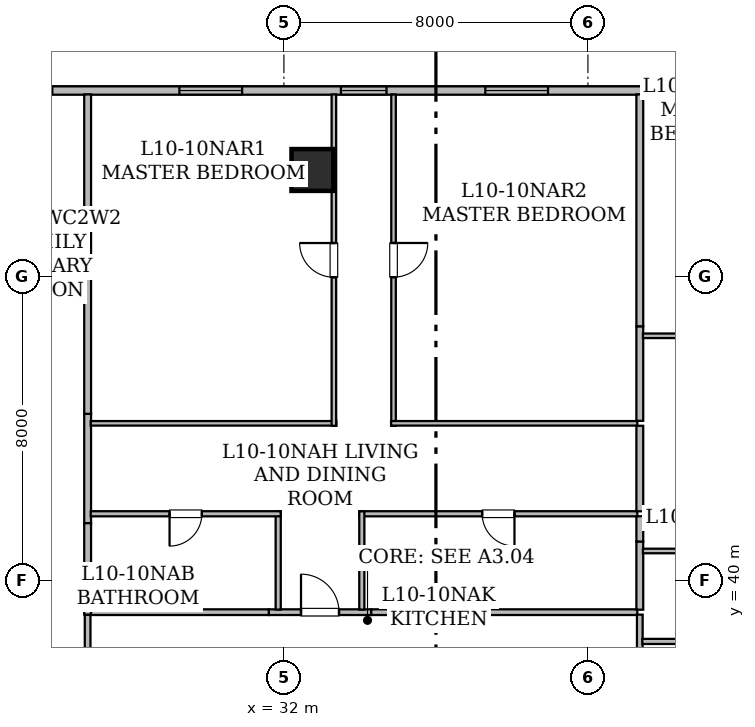
"""IFC4 building model, lengths in metres.
Left out: names, types, materials, properties, quantities, classifications, styles, units other than length and angle.
Written with IfcOpenShell. Run it as: python <this file> out.ifc"""

import sys

from ifc_helpers import new_model, si_unit, direction, frame, frame_2d, origin, origin_2d, place, context, subcontext, project, spatial, rectangle, hollow_rectangle, extrude, element, fill, save


model = new_model("IFC4")
c1 = context("Model", 3, precision=1e-05, world=origin(), true_north=direction((0.0, 1.0)))
c2 = subcontext(c1, "Body", "Model", "MODEL_VIEW")
j1 = project(units=[si_unit("LENGTHUNIT", "METRE"), si_unit("PLANEANGLEUNIT", "RADIAN")], contexts=[c1])
p1 = place(None, origin())
s1 = spatial("IfcSite", under=j1, at=p1, CompositionType="ELEMENT")
p2 = place(p1, origin())
s2 = spatial("IfcBuilding", under=s1, at=p2, CompositionType="ELEMENT")
p3 = place(p2, frame((0.0, 0.0, 44.25)))
s3 = spatial("IfcBuildingStorey", under=s2, at=p3, CompositionType="ELEMENT", Elevation=44.25)
p4 = place(p3, frame((32.75, 50.8, 0.0), z_axis=(0.0, 0.0, 1.0), x_axis=(1.0, 0.0, 0.0)))
e1 = element("IfcColumn", 1, at=p4, inside=s3, PredefinedType="COLUMN", context=c2, shape_type="SweptSolid", body=[
    extrude(hollow_rectangle(XDim=1.1, YDim=1.1, WallThickness=0.055, at=origin_2d()), origin(), (0.0, 0.0, 1.0), 3.65),
])
p5 = place(p3, frame((8.315, 52.89, 0.0), z_axis=(0.0, 0.0, 1.0), x_axis=(1.0, 0.0, 0.0)))
e2 = element("IfcWall", 2, at=p5, inside=s3, PredefinedType="STANDARD", context=c2, shape_type="SweptSolid", body=[
    extrude(rectangle(XDim=37.439, YDim=0.22, at=frame_2d((18.719, 0.0))), origin(), (0.0, 0.0, 1.0), 3.43),
])
p6 = place(p5, frame((3.164, 0.0, 0.85)))
e3 = element("IfcOpeningElement", 3, at=p6, cuts=e2, PredefinedType="OPENING", context=c2, shape_type="SweptSolid", body=[
    extrude(rectangle(XDim=1.65, YDim=1.55, at=frame_2d((0.825, 0.775))), frame((0.0, 0.12, 0.0), z_axis=(0.0, -1.0, 0.0), x_axis=(1.0, 0.0, 0.0)), (0.0, 0.0, 1.0), 0.24),
])
p7 = place(p5, frame((15.94, 0.0, 0.85)))
e4 = element("IfcOpeningElement", 4, at=p7, cuts=e2, PredefinedType="OPENING", context=c2, shape_type="SweptSolid", body=[
    extrude(rectangle(XDim=1.65, YDim=1.55, at=frame_2d((0.825, 0.775))), frame((0.0, 0.12, 0.0), z_axis=(0.0, -1.0, 0.0), x_axis=(1.0, 0.0, 0.0)), (0.0, 0.0, 1.0), 0.24),
])
p8 = place(p5, frame((13.619, 0.0, 0.8)))
e5 = element("IfcOpeningElement", 5, at=p8, cuts=e2, PredefinedType="OPENING", context=c2, shape_type="SweptSolid", body=[
    extrude(rectangle(XDim=1.2, YDim=1.5, at=frame_2d((0.6, 0.75))), frame((0.0, 0.12, 0.0), z_axis=(0.0, -1.0, 0.0), x_axis=(1.0, 0.0, 0.0)), (0.0, 0.0, 1.0), 0.24),
])
p9 = place(p5, frame((8.999, 0.0, 0.85)))
e6 = element("IfcOpeningElement", 6, at=p9, cuts=e2, PredefinedType="OPENING", context=c2, shape_type="SweptSolid", body=[
    extrude(rectangle(XDim=1.65, YDim=1.55, at=frame_2d((0.825, 0.775))), frame((0.0, 0.12, 0.0), z_axis=(0.0, -1.0, 0.0), x_axis=(1.0, 0.0, 0.0)), (0.0, 0.0, 1.0), 0.24),
])
p10 = place(p5, frame((25.185, 0.0, 0.8)))
e7 = element("IfcOpeningElement", 7, at=p10, cuts=e2, PredefinedType="OPENING", context=c2, shape_type="SweptSolid", body=[
    extrude(rectangle(XDim=1.2, YDim=1.5, at=frame_2d((0.6, 0.75))), frame((0.0, 0.12, 0.0), z_axis=(0.0, -1.0, 0.0), x_axis=(1.0, 0.0, 0.0)), (0.0, 0.0, 1.0), 0.24),
])
p11 = place(p5, frame((20.935, 0.0, 0.85)))
e8 = element("IfcOpeningElement", 8, at=p11, cuts=e2, PredefinedType="OPENING", context=c2, shape_type="SweptSolid", body=[
    extrude(rectangle(XDim=1.65, YDim=1.55, at=frame_2d((0.825, 0.775))), frame((0.0, 0.12, 0.0), z_axis=(0.0, -1.0, 0.0), x_axis=(1.0, 0.0, 0.0)), (0.0, 0.0, 1.0), 0.24),
])
p12 = place(p5, frame((28.985, 0.0, 0.85)))
e9 = element("IfcOpeningElement", 9, at=p12, cuts=e2, PredefinedType="OPENING", context=c2, shape_type="SweptSolid", body=[
    extrude(rectangle(XDim=1.65, YDim=1.55, at=frame_2d((0.825, 0.775))), frame((0.0, 0.12, 0.0), z_axis=(0.0, -1.0, 0.0), x_axis=(1.0, 0.0, 0.0)), (0.0, 0.0, 1.0), 0.24),
])
p13 = place(p5, frame((33.98, 0.0, 0.85)))
e10 = element("IfcOpeningElement", 10, at=p13, cuts=e2, PredefinedType="OPENING", context=c2, shape_type="SweptSolid", body=[
    extrude(rectangle(XDim=1.65, YDim=1.55, at=frame_2d((0.825, 0.775))), frame((0.0, 0.12, 0.0), z_axis=(0.0, -1.0, 0.0), x_axis=(1.0, 0.0, 0.0)), (0.0, 0.0, 1.0), 0.24),
])
p14 = place(p3, frame((26.835, 35.457, 0.0), z_axis=(0.0, 0.0, 1.0), x_axis=(0.0, 1.0, 0.0)))
e11 = element("IfcWall", 11, at=p14, inside=s3, PredefinedType="STANDARD", context=c2, shape_type="SweptSolid", body=[
    extrude(rectangle(XDim=3.643, YDim=0.15, at=frame_2d((1.822, 0.0))), origin(), (0.0, 0.0, 1.0), 2.647),
])
p15 = place(p3, frame((31.601, 39.165, 0.0), z_axis=(0.0, 0.0, 1.0), x_axis=(1.0, 0.0, 0.0)))
e12 = element("IfcWall", 12, at=p15, inside=s3, PredefinedType="STANDARD", context=c2, shape_type="SweptSolid", body=[
    extrude(rectangle(XDim=2.698, YDim=0.15, at=frame_2d((1.349, 0.0))), origin(), (0.0, 0.0, 1.0), 3.43),
])
p16 = place(p15, frame((0.849, 0.0, 0.0)))
e13 = element("IfcOpeningElement", 13, at=p16, cuts=e12, PredefinedType="OPENING", context=c2, shape_type="SweptSolid", body=[
    extrude(rectangle(XDim=1.0, YDim=2.15, at=frame_2d((0.5, 1.075))), frame((0.0, 0.085, 0.0), z_axis=(0.0, -1.0, 0.0), x_axis=(1.0, 0.0, 0.0)), (0.0, 0.0, 1.0), 0.17),
])
p17 = place(p3, frame((26.9, 39.165, 0.0), z_axis=(0.0, 0.0, 1.0), x_axis=(1.0, 0.0, 0.0)))
e14 = element("IfcWall", 14, at=p17, inside=s3, PredefinedType="STANDARD", context=c2, shape_type="SweptSolid", body=[
    extrude(rectangle(XDim=4.701, YDim=0.15, at=frame_2d((2.351, 0.0))), origin(), (0.0, 0.0, 1.0), 2.647),
])
p18 = place(p3, frame((34.299, 39.165, 0.0), z_axis=(0.0, 0.0, 1.0), x_axis=(1.0, 0.0, 0.0)))
e15 = element("IfcWall", 15, at=p18, inside=s3, PredefinedType="STANDARD", context=c2, shape_type="SweptSolid", body=[
    extrude(rectangle(XDim=7.001, YDim=0.15, at=frame_2d((3.5, 0.0))), origin(), (0.0, 0.0, 1.0), 3.43),
])
p19 = place(p3, frame((41.365, 39.1, 0.0), z_axis=(0.0, 0.0, 1.0), x_axis=(0.0, -1.0, 0.0)))
e16 = element("IfcWall", 16, at=p19, inside=s3, PredefinedType="STANDARD", context=c2, shape_type="SweptSolid", body=[
    extrude(rectangle(XDim=0.954, YDim=0.15, at=frame_2d((0.477, 0.0))), origin(), (0.0, 0.0, 1.0), 3.43),
])
p20 = place(p3, frame((26.835, 44.383, 0.0), z_axis=(0.0, 0.0, 1.0), x_axis=(0.0, -1.0, 0.0)))
e17 = element("IfcWall", 17, at=p20, inside=s3, PredefinedType="STANDARD", context=c2, shape_type="SweptSolid", body=[
    extrude(rectangle(XDim=2.878, YDim=0.18, at=frame_2d((1.439, 0.0))), origin(), (0.0, 0.0, 1.0), 2.957),
])
p21 = place(p3, frame((26.835, 41.505, 0.0), z_axis=(0.0, 0.0, 1.0), x_axis=(0.0, -1.0, 0.0)))
e18 = element("IfcWall", 18, at=p21, inside=s3, PredefinedType="STANDARD", context=c2, shape_type="SweptSolid", body=[
    extrude(rectangle(XDim=2.405, YDim=0.18, at=frame_2d((1.202, 0.0))), origin(), (0.0, 0.0, 1.0), 3.43),
])
p22 = place(p3, frame((26.835, 52.788, 0.0), z_axis=(0.0, 0.0, 1.0), x_axis=(0.0, -1.0, 0.0)))
e19 = element("IfcWall", 19, at=p22, inside=s3, PredefinedType="STANDARD", context=c2, shape_type="SweptSolid", body=[
    extrude(rectangle(XDim=8.405, YDim=0.18, at=frame_2d((4.203, 0.0))), origin(), (0.0, 0.0, 1.0), 2.803),
])
p23 = place(p3, frame((31.85, 39.232, 0.0), z_axis=(0.0, 0.0, 1.0), x_axis=(0.0, 1.0, 0.0)))
e20 = element("IfcWall", 20, at=p23, inside=s3, PredefinedType="PARTITIONING", context=c2, shape_type="SweptSolid", body=[
    extrude(rectangle(XDim=2.587, YDim=0.135, at=frame_2d((1.293, 0.0))), origin(), (0.0, 0.0, 1.0), 3.43),
])
p24 = place(p3, frame((31.915, 41.754, 0.0), z_axis=(0.0, 0.0, 1.0), x_axis=(-1.0, 0.0, 0.0)))
e21 = element("IfcWall", 21, at=p24, inside=s3, PredefinedType="PARTITIONING", context=c2, shape_type="SweptSolid", body=[
    extrude(rectangle(XDim=4.998, YDim=0.135, at=frame_2d((2.499, 0.0))), origin(), (0.0, 0.0, 1.0), 2.647),
])
p25 = place(p24, frame((2.074, 0.0, 0.0)))
e22 = element("IfcOpeningElement", 22, at=p25, cuts=e21, PredefinedType="OPENING", context=c2, shape_type="SweptSolid", body=[
    extrude(rectangle(XDim=0.85, YDim=2.1, at=frame_2d((0.425, 1.05))), frame((0.0, 0.077, 0.0), z_axis=(0.0, -1.0, 0.0), x_axis=(1.0, 0.0, 0.0)), (0.0, 0.0, 1.0), 0.155),
])
p26 = place(p3, frame((41.3, 41.754, 0.0), z_axis=(0.0, 0.0, 1.0), x_axis=(-1.0, 0.0, 0.0)))
e23 = element("IfcWall", 23, at=p26, inside=s3, PredefinedType="PARTITIONING", context=c2, shape_type="SweptSolid", body=[
    extrude(rectangle(XDim=7.315, YDim=0.135, at=frame_2d((3.657, 0.0))), origin(), (0.0, 0.0, 1.0), 3.43),
])
p27 = place(p26, frame((3.233, 0.0, 0.0)))
e24 = element("IfcOpeningElement", 24, at=p27, cuts=e23, PredefinedType="OPENING", context=c2, shape_type="SweptSolid", body=[
    extrude(rectangle(XDim=0.85, YDim=2.1, at=frame_2d((0.425, 1.05))), frame((0.0, 0.077, 0.0), z_axis=(0.0, -1.0, 0.0), x_axis=(1.0, 0.0, 0.0)), (0.0, 0.0, 1.0), 0.155),
])
p28 = place(p3, frame((34.05, 41.819, 0.0), z_axis=(0.0, 0.0, 1.0), x_axis=(0.0, -1.0, 0.0)))
e25 = element("IfcWall", 25, at=p28, inside=s3, PredefinedType="PARTITIONING", context=c2, shape_type="SweptSolid", body=[
    extrude(rectangle(XDim=2.587, YDim=0.135, at=frame_2d((1.293, 0.0))), origin(), (0.0, 0.0, 1.0), 3.43),
])
p29 = place(p3, frame((26.917, 44.134, 0.0), z_axis=(0.0, 0.0, 1.0), x_axis=(1.0, 0.0, 0.0)))
e26 = element("IfcWall", 26, at=p29, inside=s3, PredefinedType="PARTITIONING", context=c2, shape_type="SweptSolid", body=[
    extrude(rectangle(XDim=6.463, YDim=0.12, at=frame_2d((3.231, 0.0))), origin(), (0.0, 0.0, 1.0), 2.647),
])
p30 = place(p3, frame((33.315, 44.069, 0.0), z_axis=(0.0, 0.0, 1.0), x_axis=(0.0, 1.0, 0.0)))
e27 = element("IfcWall", 27, at=p30, inside=s3, PredefinedType="PARTITIONING", context=c2, shape_type="SweptSolid", body=[
    extrude(rectangle(XDim=8.719, YDim=0.12, at=frame_2d((4.359, 0.0))), origin(), (0.0, 0.0, 1.0), 2.803),
])
p31 = place(p30, frame((3.909, 0.0, 0.0)))
e28 = element("IfcOpeningElement", 28, at=p31, cuts=e27, PredefinedType="OPENING", context=c2, shape_type="SweptSolid", body=[
    extrude(rectangle(XDim=0.9, YDim=2.1, at=frame_2d((0.45, 1.05))), frame((0.0, 0.07, 0.0), z_axis=(0.0, -1.0, 0.0), x_axis=(1.0, 0.0, 0.0)), (0.0, 0.0, 1.0), 0.14),
])
p32 = place(p3, frame((34.885, 52.788, 0.0), z_axis=(0.0, 0.0, 1.0), x_axis=(0.0, -1.0, 0.0)))
e29 = element("IfcWall", 29, at=p32, inside=s3, PredefinedType="PARTITIONING", context=c2, shape_type="SweptSolid", body=[
    extrude(rectangle(XDim=8.719, YDim=0.12, at=frame_2d((4.359, 0.0))), origin(), (0.0, 0.0, 1.0), 2.803),
])
p33 = place(p32, frame((3.909, 0.0, 0.0)))
e30 = element("IfcOpeningElement", 30, at=p33, cuts=e29, PredefinedType="OPENING", context=c2, shape_type="SweptSolid", body=[
    extrude(rectangle(XDim=0.9, YDim=2.1, at=frame_2d((0.45, 1.05))), frame((0.0, 0.07, 0.0), z_axis=(0.0, -1.0, 0.0), x_axis=(1.0, 0.0, 0.0)), (0.0, 0.0, 1.0), 0.14),
])
p34 = place(p3, frame((34.82, 44.134, 0.0), z_axis=(0.0, 0.0, 1.0), x_axis=(1.0, 0.0, 0.0)))
e31 = element("IfcWall", 31, at=p34, inside=s3, PredefinedType="PARTITIONING", context=c2, shape_type="SweptSolid", body=[
    extrude(rectangle(XDim=6.48, YDim=0.12, at=frame_2d((3.24, 0.0))), origin(), (0.0, 0.0, 1.0), 3.43),
])
p35 = place(p3, frame((41.365, 44.069, 0.0), z_axis=(0.0, 0.0, 1.0), x_axis=(0.0, -1.0, 0.0)))
e32 = element("IfcWall", 32, at=p35, inside=s3, PredefinedType="STANDARD", context=c2, shape_type="SweptSolid", body=[
    extrude(rectangle(XDim=2.25, YDim=0.18, at=frame_2d((1.125, 0.0))), origin(), (0.0, 0.0, 1.0), 2.957),
])
p36 = place(p3, frame((41.365, 41.024, 0.0), z_axis=(0.0, 0.0, 1.0), x_axis=(0.0, -1.0, 0.0)))
e33 = element("IfcWall", 33, at=p36, inside=s3, PredefinedType="STANDARD", context=c2, shape_type="SweptSolid", body=[
    extrude(rectangle(XDim=1.794, YDim=0.18, at=frame_2d((0.897, 0.0))), origin(), (0.0, 0.0, 1.0), 3.43),
])
p37 = place(p3, frame((41.365, 41.689, 0.0), z_axis=(0.0, 0.0, 1.0), x_axis=(0.0, -1.0, 0.0)))
e34 = element("IfcWall", 34, at=p37, inside=s3, PredefinedType="STANDARD", context=c2, shape_type="SweptSolid", body=[
    extrude(rectangle(XDim=0.665, YDim=0.18, at=frame_2d((0.333, 0.0))), origin(), (0.0, 0.0, 1.0), 3.43),
])
p38 = place(p3, frame((41.365, 46.687, 0.0), z_axis=(0.0, 0.0, 1.0), x_axis=(0.0, -1.0, 0.0)))
e35 = element("IfcWall", 35, at=p38, inside=s3, PredefinedType="STANDARD", context=c2, shape_type="SweptSolid", body=[
    extrude(rectangle(XDim=2.488, YDim=0.18, at=frame_2d((1.244, 0.0))), origin(), (0.0, 0.0, 1.0), 3.43),
])
p39 = place(p3, frame((41.365, 52.788, 0.0), z_axis=(0.0, 0.0, 1.0), x_axis=(0.0, -1.0, 0.0)))
e36 = element("IfcWall", 36, at=p39, inside=s3, PredefinedType="STANDARD", context=c2, shape_type="SweptSolid", body=[
    extrude(rectangle(XDim=6.101, YDim=0.18, at=frame_2d((3.051, 0.0))), origin(), (0.0, 0.0, 1.0), 2.803),
])
p40 = place(p3, frame((44.625, 38.395, 0.0), z_axis=(0.0, 0.0, 1.0), x_axis=(-1.0, 0.0, 0.0)))
e37 = element("IfcWall", 37, at=p40, inside=s3, PredefinedType="PARTITIONING", context=c2, shape_type="SweptSolid", body=[
    extrude(rectangle(XDim=3.193, YDim=0.135, at=frame_2d((1.597, 0.0))), origin(), (0.0, 0.0, 1.0), 2.647),
])
p41 = place(p3, frame((41.447, 40.775, 0.0), z_axis=(0.0, 0.0, 1.0), x_axis=(1.0, 0.0, 0.0)))
e38 = element("IfcWall", 38, at=p41, inside=s3, PredefinedType="PARTITIONING", context=c2, shape_type="SweptSolid", body=[
    extrude(rectangle(XDim=3.493, YDim=0.12, at=frame_2d((1.747, 0.0))), origin(), (0.0, 0.0, 1.0), 2.647),
])
p42 = place(p3, frame((41.447, 46.437, 0.0), z_axis=(0.0, 0.0, 1.0), x_axis=(1.0, 0.0, 0.0)))
e39 = element("IfcWall", 39, at=p42, inside=s3, PredefinedType="PARTITIONING", context=c2, shape_type="SweptSolid", body=[
    extrude(rectangle(XDim=3.374, YDim=0.12, at=frame_2d((1.687, 0.0))), origin(), (0.0, 0.0, 1.0), 2.647),
])
p43 = place(p7, origin())
e40 = element("IfcWindow", 40, at=p43, inside=s3, PartitioningType="SINGLE_PANEL", PredefinedType="WINDOW", context=c2, shape_type="SweptSolid", body=[
    extrude(rectangle(XDim=1.65, YDim=1.55, at=frame_2d((0.825, 0.775))), frame((0.0, 0.03, 0.0), z_axis=(0.0, -1.0, 0.0), x_axis=(1.0, 0.0, 0.0)), (0.0, 0.0, 1.0), 0.06),
])
fill(e4, e40)
p44 = place(p10, origin())
e41 = element("IfcWindow", 41, at=p44, inside=s3, PartitioningType="SINGLE_PANEL", PredefinedType="WINDOW", context=c2, shape_type="SweptSolid", body=[
    extrude(rectangle(XDim=1.2, YDim=1.5, at=frame_2d((0.6, 0.75))), frame((0.0, 0.03, 0.0), z_axis=(0.0, -1.0, 0.0), x_axis=(1.0, 0.0, 0.0)), (0.0, 0.0, 1.0), 0.06),
])
fill(e7, e41)
p45 = place(p11, origin())
e42 = element("IfcWindow", 42, at=p45, inside=s3, PartitioningType="SINGLE_PANEL", PredefinedType="WINDOW", context=c2, shape_type="SweptSolid", body=[
    extrude(rectangle(XDim=1.65, YDim=1.55, at=frame_2d((0.825, 0.775))), frame((0.0, 0.03, 0.0), z_axis=(0.0, -1.0, 0.0), x_axis=(1.0, 0.0, 0.0)), (0.0, 0.0, 1.0), 0.06),
])
fill(e8, e42)
p46 = place(p12, origin())
e43 = element("IfcWindow", 43, at=p46, inside=s3, PartitioningType="SINGLE_PANEL", PredefinedType="WINDOW", context=c2, shape_type="SweptSolid", body=[
    extrude(rectangle(XDim=1.65, YDim=1.55, at=frame_2d((0.825, 0.775))), frame((0.0, 0.03, 0.0), z_axis=(0.0, -1.0, 0.0), x_axis=(1.0, 0.0, 0.0)), (0.0, 0.0, 1.0), 0.06),
])
fill(e9, e43)
p47 = place(p13, origin())
e44 = element("IfcWindow", 44, at=p47, inside=s3, PartitioningType="SINGLE_PANEL", PredefinedType="WINDOW", context=c2, shape_type="SweptSolid", body=[
    extrude(rectangle(XDim=1.65, YDim=1.55, at=frame_2d((0.825, 0.775))), frame((0.0, 0.03, 0.0), z_axis=(0.0, -1.0, 0.0), x_axis=(1.0, 0.0, 0.0)), (0.0, 0.0, 1.0), 0.06),
])
fill(e10, e44)
p48 = place(p16, origin())
e45 = element("IfcDoor", 45, at=p48, inside=s3, OperationType="SINGLE_SWING_LEFT", PredefinedType="DOOR", context=c2, shape_type="SweptSolid", body=[
    extrude(rectangle(XDim=1.0, YDim=2.15, at=frame_2d((0.5, 1.075))), frame((0.0, 0.025, 0.0), z_axis=(0.0, -1.0, 0.0), x_axis=(1.0, 0.0, 0.0)), (0.0, 0.0, 1.0), 0.05),
])
fill(e13, e45)
p49 = place(p25, origin())
e46 = element("IfcDoor", 46, at=p49, inside=s3, OperationType="SINGLE_SWING_RIGHT", PredefinedType="DOOR", context=c2, shape_type="SweptSolid", body=[
    extrude(rectangle(XDim=0.85, YDim=2.1, at=frame_2d((0.425, 1.05))), frame((0.0, 0.025, 0.0), z_axis=(0.0, -1.0, 0.0), x_axis=(1.0, 0.0, 0.0)), (0.0, 0.0, 1.0), 0.05),
])
fill(e22, e46)
p50 = place(p27, origin())
e47 = element("IfcDoor", 47, at=p50, inside=s3, OperationType="SINGLE_SWING_LEFT", PredefinedType="DOOR", context=c2, shape_type="SweptSolid", body=[
    extrude(rectangle(XDim=0.85, YDim=2.1, at=frame_2d((0.425, 1.05))), frame((0.0, 0.025, 0.0), z_axis=(0.0, -1.0, 0.0), x_axis=(1.0, 0.0, 0.0)), (0.0, 0.0, 1.0), 0.05),
])
fill(e24, e47)
p51 = place(p31, origin())
e48 = element("IfcDoor", 48, at=p51, inside=s3, OperationType="SINGLE_SWING_RIGHT", PredefinedType="DOOR", context=c2, shape_type="SweptSolid", body=[
    extrude(rectangle(XDim=0.9, YDim=2.1, at=frame_2d((0.45, 1.05))), frame((0.0, 0.025, 0.0), z_axis=(0.0, -1.0, 0.0), x_axis=(1.0, 0.0, 0.0)), (0.0, 0.0, 1.0), 0.05),
])
fill(e28, e48)
p52 = place(p33, origin())
e49 = element("IfcDoor", 49, at=p52, inside=s3, OperationType="SINGLE_SWING_LEFT", PredefinedType="DOOR", context=c2, shape_type="SweptSolid", body=[
    extrude(rectangle(XDim=0.9, YDim=2.1, at=frame_2d((0.45, 1.05))), frame((0.0, 0.025, 0.0), z_axis=(0.0, -1.0, 0.0), x_axis=(1.0, 0.0, 0.0)), (0.0, 0.0, 1.0), 0.05),
])
fill(e30, e49)
save(model, sys.argv[1])
